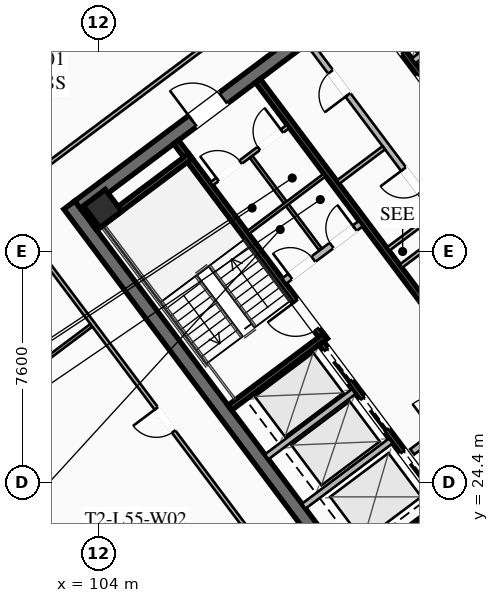
"""IFC4 building model, lengths in metres.
Left out: names, types, materials, properties, quantities, classifications, styles, units other than length and angle.
Written with IfcOpenShell. Run it as: python <this file> out.ifc"""

import sys

from ifc_helpers import new_model, si_unit, direction, frame, frame_2d, origin, origin_2d, place, context, subcontext, project, spatial, rectangle, hollow_rectangle, extrude, element, fill, save


model = new_model("IFC4")
c1 = context("Model", 3, precision=1e-05, world=origin(), true_north=direction((0.0, 1.0)))
c2 = subcontext(c1, "Body", "Model", "MODEL_VIEW")
j1 = project(units=[si_unit("LENGTHUNIT", "METRE"), si_unit("PLANEANGLEUNIT", "RADIAN")], contexts=[c1])
p1 = place(None, origin())
s1 = spatial("IfcSite", under=j1, at=p1, CompositionType="ELEMENT")
p2 = place(p1, origin())
s2 = spatial("IfcBuilding", under=s1, at=p2, CompositionType="ELEMENT")
p3 = place(p2, frame((0.0, 0.0, 204.2)))
s3 = spatial("IfcBuildingStorey", under=s2, at=p3, CompositionType="ELEMENT", Elevation=204.2)
p4 = place(p3, frame((112.396, 21.047, 0.0), z_axis=(0.0, 0.0, 1.0), x_axis=(-0.600005007985, 0.799996243986, 0.0)))
e1 = element("IfcWall", 1, at=p4, inside=s3, PredefinedType="SHEAR", context=c2, shape_type="SweptSolid", body=[
    extrude(rectangle(XDim=15.6, YDim=0.45, at=frame_2d((7.8, 0.0))), origin(), (0.0, 0.0, 1.0), 3.55),
])
p5 = place(p3, frame((124.649, 30.518, 0.0), z_axis=(0.0, 0.0, 1.0), x_axis=(-0.8, -0.6, 0.0)))
e2 = element("IfcWall", 2, at=p5, inside=s3, PredefinedType="SHEAR", context=c2, shape_type="SweptSolid", body=[
    extrude(rectangle(XDim=15.26, YDim=0.45, at=frame_2d((7.63, 0.0))), origin(), (0.0, 0.0, 1.0), 3.55),
])
p6 = place(p5, frame((9.33, 0.0, 0.0)))
e3 = element("IfcOpeningElement", 3, at=p6, cuts=e2, PredefinedType="OPENING", context=c2, shape_type="SweptSolid", body=[
    extrude(rectangle(XDim=1.25, YDim=2.25, at=frame_2d((0.625, 1.125))), frame((0.0, 0.235, 0.0), z_axis=(0.0, -1.0, 0.0), x_axis=(1.0, 0.0, 0.0)), (0.0, 0.0, 1.0), 0.47),
])
p7 = place(p5, frame((4.28, 0.0, 0.0)))
e4 = element("IfcOpeningElement", 4, at=p7, cuts=e2, PredefinedType="OPENING", context=c2, shape_type="SweptSolid", body=[
    extrude(rectangle(XDim=1.25, YDim=2.25, at=frame_2d((0.625, 1.125))), frame((0.0, 0.235, 0.0), z_axis=(0.0, -1.0, 0.0), x_axis=(1.0, 0.0, 0.0)), (0.0, 0.0, 1.0), 0.47),
])
p8 = place(p3, frame((103.351, 33.482, 0.0), z_axis=(0.0, 0.0, 1.0), x_axis=(0.8, 0.6, 0.0)))
e5 = element("IfcWall", 5, at=p8, inside=s3, PredefinedType="SHEAR", context=c2, shape_type="SweptSolid", body=[
    extrude(rectangle(XDim=15.26, YDim=0.45, at=frame_2d((7.63, 0.0))), origin(), (0.0, 0.0, 1.0), 3.55),
])
p9 = place(p8, frame((4.68, 0.0, 0.0)))
e6 = element("IfcOpeningElement", 6, at=p9, cuts=e5, PredefinedType="OPENING", context=c2, shape_type="SweptSolid", body=[
    extrude(rectangle(XDim=1.25, YDim=2.25, at=frame_2d((0.625, 1.125))), frame((0.0, 0.235, 0.0), z_axis=(0.0, -1.0, 0.0), x_axis=(1.0, 0.0, 0.0)), (0.0, 0.0, 1.0), 0.47),
])
p10 = place(p8, frame((9.73, 0.0, 0.0)))
e7 = element("IfcOpeningElement", 7, at=p10, cuts=e5, PredefinedType="OPENING", context=c2, shape_type="SweptSolid", body=[
    extrude(rectangle(XDim=1.25, YDim=2.25, at=frame_2d((0.625, 1.125))), frame((0.0, 0.235, 0.0), z_axis=(0.0, -1.0, 0.0), x_axis=(1.0, 0.0, 0.0)), (0.0, 0.0, 1.0), 0.47),
])
p11 = place(p3, frame((104.13, 33.41, 0.0), z_axis=(0.0, 0.0, 1.0), x_axis=(0.799999996291, 0.600000004945, 0.0)))
e8 = element("IfcColumn", 8, at=p11, inside=s3, PredefinedType="COLUMN", context=c2, shape_type="SweptSolid", body=[
    extrude(hollow_rectangle(XDim=0.9, YDim=0.9, WallThickness=0.04, at=origin_2d()), origin(), (0.0, 0.0, 1.0), 3.37),
])
p12 = place(p3, frame((111.44, 29.08, 0.0), z_axis=(0.0, 0.0, 1.0), x_axis=(-0.59999041401, 0.800007189403, 0.0)))
e9 = element("IfcWall", 9, at=p12, inside=s3, PredefinedType="SHEAR", context=c2, shape_type="SweptSolid", body=[
    extrude(rectangle(XDim=8.15, YDim=0.2, at=frame_2d((4.075, 0.0))), origin(), (0.0, 0.0, 1.0), 3.37),
])
p13 = place(p12, frame((0.45, 0.0, 0.0)))
e10 = element("IfcOpeningElement", 10, at=p13, cuts=e9, PredefinedType="OPENING", context=c2, shape_type="SweptSolid", body=[
    extrude(rectangle(XDim=1.15, YDim=2.2, at=frame_2d((0.575, 1.1))), frame((0.0, 0.11, 0.0), z_axis=(0.0, -1.0, 0.0), x_axis=(1.0, 0.0, 0.0)), (0.0, 0.0, 1.0), 0.22),
])
for number, where, z_axis, x_axis in (
    (11, (108.316, 26.862, 0.0), (0.0, 0.0, 1.0), (0.8, 0.6, 0.0)),
    (12, (103.876, 32.782, 0.0), (0.0, 0.0, 1.0), (0.8, 0.6, 0.0)),
):
    element("IfcWall", number, at=place(p3, frame(where, z_axis=z_axis, x_axis=x_axis)), inside=s3, PredefinedType="SHEAR", context=c2, shape_type="SweptSolid", body=[
        extrude(rectangle(XDim=3.93, YDim=0.2, at=frame_2d((1.965, 0.0))), origin(), (0.0, 0.0, 1.0), 3.37),
    ])
p14 = place(p3, frame((118.058, 25.856, 0.0), z_axis=(0.0, 0.0, 1.0), x_axis=(-0.600002657301, 0.799998007018, 0.0)))
e13 = element("IfcWall", 13, at=p14, inside=s3, PredefinedType="SHEAR", context=c2, shape_type="SweptSolid", body=[
    extrude(rectangle(XDim=14.7, YDim=0.2, at=frame_2d((7.35, 0.0))), origin(), (0.0, 0.0, 1.0), 3.37),
])
p15 = place(p3, frame((110.104, 31.028, 0.0), z_axis=(0.0, 0.0, 1.0), x_axis=(0.800018601094, 0.59997519774, 0.0)))
e14 = element("IfcWall", 14, at=p15, inside=s3, PredefinedType="SOLIDWALL", context=c2, shape_type="SweptSolid", body=[
    extrude(rectangle(XDim=3.15, YDim=0.22, at=frame_2d((1.575, 0.0))), origin(), (0.0, 0.0, 1.0), 2.723),
])
p16 = place(p15, frame((0.25, 0.0, 0.0)))
e15 = element("IfcOpeningElement", 15, at=p16, cuts=e14, PredefinedType="OPENING", context=c2, shape_type="SweptSolid", body=[
    extrude(rectangle(XDim=0.95, YDim=2.05, at=frame_2d((0.475, 1.025))), frame((0.0, 0.12, 0.0), z_axis=(0.0, -1.0, 0.0), x_axis=(1.0, 0.0, 0.0)), (0.0, 0.0, 1.0), 0.24),
])
p17 = place(p15, frame((1.95, 0.0, 0.0)))
e16 = element("IfcOpeningElement", 16, at=p17, cuts=e14, PredefinedType="OPENING", context=c2, shape_type="SweptSolid", body=[
    extrude(rectangle(XDim=0.95, YDim=2.05, at=frame_2d((0.475, 1.025))), frame((0.0, 0.12, 0.0), z_axis=(0.0, -1.0, 0.0), x_axis=(1.0, 0.0, 0.0)), (0.0, 0.0, 1.0), 0.24),
])
p18 = place(p3, frame((114.316, 25.412, 0.0), z_axis=(0.0, 0.0, 1.0), x_axis=(0.800018601094, 0.59997519774, 0.0)))
e17 = element("IfcWall", 17, at=p18, inside=s3, PredefinedType="SOLIDWALL", context=c2, shape_type="SweptSolid", body=[
    extrude(rectangle(XDim=3.15, YDim=0.22, at=frame_2d((1.575, 0.0))), origin(), (0.0, 0.0, 1.0), 2.723),
])
p19 = place(p18, frame((0.95, 0.0, 0.0)))
e18 = element("IfcOpeningElement", 18, at=p19, cuts=e17, PredefinedType="OPENING", context=c2, shape_type="SweptSolid", body=[
    extrude(rectangle(XDim=1.25, YDim=2.25, at=frame_2d((0.625, 1.125))), frame((0.0, 0.12, 0.0), z_axis=(0.0, -1.0, 0.0), x_axis=(1.0, 0.0, 0.0)), (0.0, 0.0, 1.0), 0.24),
])
p20 = place(p3, frame((115.25, 23.75, 0.0), z_axis=(0.0, 0.0, 1.0), x_axis=(-0.599994036198, 0.800004472816, 0.0)))
e19 = element("IfcWall", 19, at=p20, inside=s3, PredefinedType="SHEAR", context=c2, shape_type="SweptSolid", body=[
    extrude(rectangle(XDim=6.55, YDim=0.2, at=frame_2d((3.275, 0.0))), origin(), (0.0, 0.0, 1.0), 3.37),
])
p21 = place(p20, frame((4.975, 0.0, 0.0)))
e20 = element("IfcOpeningElement", 20, at=p21, cuts=e19, PredefinedType="OPENING", context=c2, shape_type="SweptSolid", body=[
    extrude(rectangle(XDim=1.3, YDim=2.25, at=frame_2d((0.65, 1.125))), frame((0.0, 0.11, 0.0), z_axis=(0.0, -1.0, 0.0), x_axis=(1.0, 0.0, 0.0)), (0.0, 0.0, 1.0), 0.22),
])
p22 = place(p20, frame((2.975, 0.0, 0.0)))
e21 = element("IfcOpeningElement", 21, at=p22, cuts=e19, PredefinedType="OPENING", context=c2, shape_type="SweptSolid", body=[
    extrude(rectangle(XDim=1.3, YDim=2.25, at=frame_2d((0.65, 1.125))), frame((0.0, 0.11, 0.0), z_axis=(0.0, -1.0, 0.0), x_axis=(1.0, 0.0, 0.0)), (0.0, 0.0, 1.0), 0.22),
])
p23 = place(p20, frame((0.775, 0.0, 0.0)))
e22 = element("IfcOpeningElement", 22, at=p23, cuts=e19, PredefinedType="OPENING", context=c2, shape_type="SweptSolid", body=[
    extrude(rectangle(XDim=1.3, YDim=2.25, at=frame_2d((0.65, 1.125))), frame((0.0, 0.11, 0.0), z_axis=(0.0, -1.0, 0.0), x_axis=(1.0, 0.0, 0.0)), (0.0, 0.0, 1.0), 0.22),
])
for number, where, z_axis, x_axis in (
    (23, (110.746, 23.622, 0.0), (0.0, 0.0, 1.0), (0.8, 0.6, 0.0)),
    (24, (109.528, 25.246, 0.0), (0.0, 0.0, 1.0), (0.8, 0.6, 0.0)),
):
    element("IfcWall", number, at=place(p3, frame(where, z_axis=z_axis, x_axis=x_axis)), inside=s3, PredefinedType="SOLIDWALL", context=c2, shape_type="SweptSolid", body=[
        extrude(rectangle(XDim=3.58, YDim=0.2, at=frame_2d((1.79, 0.0))), origin(), (0.0, 0.0, 1.0), 3.37),
    ])
p24 = place(p3, frame((112.75, 40.25, 0.0), z_axis=(0.0, 0.0, 1.0), x_axis=(0.599994036198, -0.800004472816, 0.0)))
e25 = element("IfcWall", 25, at=p24, inside=s3, PredefinedType="SHEAR", context=c2, shape_type="SweptSolid", body=[
    extrude(rectangle(XDim=6.55, YDim=0.2, at=frame_2d((3.275, 0.0))), origin(), (0.0, 0.0, 1.0), 3.37),
])
p25 = place(p24, frame((5.075, 0.0, 0.0)))
e26 = element("IfcOpeningElement", 26, at=p25, cuts=e25, PredefinedType="OPENING", context=c2, shape_type="SweptSolid", body=[
    extrude(rectangle(XDim=1.1, YDim=2.2, at=frame_2d((0.55, 1.1))), frame((0.0, 0.11, 0.0), z_axis=(0.0, -1.0, 0.0), x_axis=(1.0, 0.0, 0.0)), (0.0, 0.0, 1.0), 0.22),
])
p26 = place(p24, frame((3.025, 0.0, 0.0)))
e27 = element("IfcOpeningElement", 27, at=p26, cuts=e25, PredefinedType="OPENING", context=c2, shape_type="SweptSolid", body=[
    extrude(rectangle(XDim=1.1, YDim=2.2, at=frame_2d((0.55, 1.1))), frame((0.0, 0.11, 0.0), z_axis=(0.0, -1.0, 0.0), x_axis=(1.0, 0.0, 0.0)), (0.0, 0.0, 1.0), 0.22),
])
p27 = place(p24, frame((1.025, 0.0, 0.0)))
e28 = element("IfcOpeningElement", 28, at=p27, cuts=e25, PredefinedType="OPENING", context=c2, shape_type="SweptSolid", body=[
    extrude(rectangle(XDim=1.1, YDim=2.2, at=frame_2d((0.55, 1.1))), frame((0.0, 0.11, 0.0), z_axis=(0.0, -1.0, 0.0), x_axis=(1.0, 0.0, 0.0)), (0.0, 0.0, 1.0), 0.22),
])
p28 = place(p3, frame((114.36, 38.27, 0.0), z_axis=(0.0, 0.0, 1.0), x_axis=(0.800008183455, 0.599989088572, 0.0)))
e29 = element("IfcWall", 29, at=p28, inside=s3, PredefinedType="SOLIDWALL", context=c2, shape_type="SweptSolid", body=[
    extrude(rectangle(XDim=3.58, YDim=0.2, at=frame_2d((1.79, 0.0))), origin(), (0.0, 0.0, 1.0), 3.37),
])
p29 = place(p3, frame((107.71, 34.22, 0.0), z_axis=(0.0, 0.0, 1.0), x_axis=(0.799981399002, 0.60002480053, 0.0)))
e30 = element("IfcWall", 30, at=p29, inside=s3, PredefinedType="PARTITIONING", context=c2, shape_type="SweptSolid", body=[
    extrude(rectangle(XDim=3.15, YDim=0.135, at=frame_2d((1.575, 0.0))), origin(), (0.0, 0.0, 1.0), 2.723),
])
p30 = place(p29, frame((0.25, 0.0, 0.0)))
e31 = element("IfcOpeningElement", 31, at=p30, cuts=e30, PredefinedType="OPENING", context=c2, shape_type="SweptSolid", body=[
    extrude(rectangle(XDim=0.95, YDim=2.05, at=frame_2d((0.475, 1.025))), frame((0.0, 0.077, 0.0), z_axis=(0.0, -1.0, 0.0), x_axis=(1.0, 0.0, 0.0)), (0.0, 0.0, 1.0), 0.155),
])
p31 = place(p29, frame((1.95, 0.0, 0.0)))
e32 = element("IfcOpeningElement", 32, at=p31, cuts=e30, PredefinedType="OPENING", context=c2, shape_type="SweptSolid", body=[
    extrude(rectangle(XDim=0.95, YDim=2.05, at=frame_2d((0.475, 1.025))), frame((0.0, 0.077, 0.0), z_axis=(0.0, -1.0, 0.0), x_axis=(1.0, 0.0, 0.0)), (0.0, 0.0, 1.0), 0.155),
])
p32 = place(p3, frame((111.296, 32.072, 0.0), z_axis=(0.0, 0.0, 1.0), x_axis=(-0.59995887973, 0.800030838552, 0.0)))
e33 = element("IfcWall", 33, at=p32, inside=s3, PredefinedType="PARTITIONING", context=c2, shape_type="SweptSolid", body=[
    extrude(rectangle(XDim=3.8, YDim=0.11, at=frame_2d((1.9, 0.0))), origin(), (0.0, 0.0, 1.0), 2.723),
])
p33 = place(p3, frame((108.91, 32.62, 0.0), z_axis=(0.0, 0.0, 1.0), x_axis=(0.800018601094, 0.59997519774, 0.0)))
e34 = element("IfcWall", 34, at=p33, inside=s3, PredefinedType="PARTITIONING", context=c2, shape_type="SweptSolid", body=[
    extrude(rectangle(XDim=3.15, YDim=0.11, at=frame_2d((1.575, 0.0))), origin(), (0.0, 0.0, 1.0), 2.723),
])
p34 = place(p3, frame((113.946, 31.522, 0.0), z_axis=(0.0, 0.0, 1.0), x_axis=(0.8, 0.6, 0.0)))
e35 = element("IfcWall", 35, at=p34, inside=s3, PredefinedType="PARTITIONING", context=c2, shape_type="SweptSolid", body=[
    extrude(rectangle(XDim=1.88, YDim=0.135, at=frame_2d((0.94, 0.0))), origin(), (0.0, 0.0, 1.0), 2.723),
])
p35 = place(p3, frame((115.11, 33.27, 0.0), z_axis=(0.0, 0.0, 1.0), x_axis=(-0.600011160345, 0.79999162962, 0.0)))
e36 = element("IfcWall", 36, at=p35, inside=s3, PredefinedType="SOLIDWALL", context=c2, shape_type="SweptSolid", body=[
    extrude(rectangle(XDim=7.0, YDim=0.2, at=frame_2d((3.5, 0.0))), origin(), (0.0, 0.0, 1.0), 2.723),
])
p36 = place(p35, frame((0.85, 0.0, 0.0)))
e37 = element("IfcOpeningElement", 37, at=p36, cuts=e36, PredefinedType="OPENING", context=c2, shape_type="SweptSolid", body=[
    extrude(rectangle(XDim=0.95, YDim=2.05, at=frame_2d((0.475, 1.025))), frame((0.0, 0.11, 0.0), z_axis=(0.0, -1.0, 0.0), x_axis=(1.0, 0.0, 0.0)), (0.0, 0.0, 1.0), 0.22),
])
p37 = place(p35, frame((4.85, 0.0, 0.0)))
e38 = element("IfcOpeningElement", 38, at=p37, cuts=e36, PredefinedType="OPENING", context=c2, shape_type="SweptSolid", body=[
    extrude(rectangle(XDim=0.95, YDim=2.05, at=frame_2d((0.475, 1.025))), frame((0.0, 0.11, 0.0), z_axis=(0.0, -1.0, 0.0), x_axis=(1.0, 0.0, 0.0)), (0.0, 0.0, 1.0), 0.22),
])
p38 = place(p3, frame((113.526, 32.082, 0.0), z_axis=(0.0, 0.0, 1.0), x_axis=(0.800046745961, 0.599937666993, 0.0)))
e39 = element("IfcWall", 39, at=p38, inside=s3, PredefinedType="PARTITIONING", context=c2, shape_type="SweptSolid", body=[
    extrude(rectangle(XDim=1.88, YDim=0.135, at=frame_2d((0.94, 0.0))), origin(), (0.0, 0.0, 1.0), 2.723),
])
p39 = place(p3, frame((111.876, 34.282, 0.0), z_axis=(0.0, 0.0, 1.0), x_axis=(0.8, 0.6, 0.0)))
e40 = element("IfcWall", 40, at=p39, inside=s3, PredefinedType="PARTITIONING", context=c2, shape_type="SweptSolid", body=[
    extrude(rectangle(XDim=1.88, YDim=0.135, at=frame_2d((0.94, 0.0))), origin(), (0.0, 0.0, 1.0), 2.723),
])
p40 = place(p3, frame((100.756, 33.692, 0.0), z_axis=(0.0, 0.0, 1.0), x_axis=(0.799998716732, 0.60000171102, 0.0)))
e41 = element("IfcWall", 41, at=p40, inside=s3, PredefinedType="PARTITIONING", context=c2, shape_type="SweptSolid", body=[
    extrude(rectangle(XDim=22.83, YDim=0.135, at=frame_2d((11.415, 0.0))), origin(), (0.0, 0.0, 1.0), 2.723),
])
p41 = place(p40, frame((9.38, 0.0, 0.0)))
e42 = element("IfcOpeningElement", 42, at=p41, cuts=e41, PredefinedType="OPENING", context=c2, shape_type="SweptSolid", body=[
    extrude(rectangle(XDim=0.95, YDim=2.05, at=frame_2d((0.475, 1.025))), frame((0.0, 0.077, 0.0), z_axis=(0.0, -1.0, 0.0), x_axis=(1.0, 0.0, 0.0)), (0.0, 0.0, 1.0), 0.155),
])
p42 = place(p40, frame((21.58, 0.0, 0.0)))
e43 = element("IfcOpeningElement", 43, at=p42, cuts=e41, PredefinedType="OPENING", context=c2, shape_type="SweptSolid", body=[
    extrude(rectangle(XDim=0.95, YDim=2.05, at=frame_2d((0.475, 1.025))), frame((0.0, 0.077, 0.0), z_axis=(0.0, -1.0, 0.0), x_axis=(1.0, 0.0, 0.0)), (0.0, 0.0, 1.0), 0.155),
])
p43 = place(p3, frame((124.462, 25.384, 0.0), z_axis=(0.0, 0.0, 1.0), x_axis=(-0.799997904343, -0.6000027942, 0.0)))
e44 = element("IfcWall", 44, at=p43, inside=s3, PredefinedType="PARTITIONING", context=c2, shape_type="SweptSolid", body=[
    extrude(rectangle(XDim=13.98, YDim=0.135, at=frame_2d((6.99, 0.0))), origin(), (0.0, 0.0, 1.0), 2.723),
])
p44 = place(p43, frame((3.635, 0.0, 0.0)))
e45 = element("IfcOpeningElement", 45, at=p44, cuts=e44, PredefinedType="OPENING", context=c2, shape_type="SweptSolid", body=[
    extrude(rectangle(XDim=0.95, YDim=2.05, at=frame_2d((0.475, 1.025))), frame((0.0, 0.077, 0.0), z_axis=(0.0, -1.0, 0.0), x_axis=(1.0, 0.0, 0.0)), (0.0, 0.0, 1.0), 0.155),
])
p45 = place(p3, frame((113.23, 17.06, 0.0), z_axis=(0.0, 0.0, 1.0), x_axis=(-0.600003772342, 0.79999717073, 0.0)))
e46 = element("IfcWall", 46, at=p45, inside=s3, PredefinedType="PARTITIONING", context=c2, shape_type="SweptSolid", body=[
    extrude(rectangle(XDim=20.71, YDim=0.135, at=frame_2d((10.355, 0.0))), origin(), (0.0, 0.0, 1.0), 2.723),
])
p46 = place(p45, frame((0.3, 0.0, 0.0)))
e47 = element("IfcOpeningElement", 47, at=p46, cuts=e46, PredefinedType="OPENING", context=c2, shape_type="SweptSolid", body=[
    extrude(rectangle(XDim=0.95, YDim=2.05, at=frame_2d((0.475, 1.025))), frame((0.0, 0.077, 0.0), z_axis=(0.0, -1.0, 0.0), x_axis=(1.0, 0.0, 0.0)), (0.0, 0.0, 1.0), 0.155),
])
p47 = place(p45, frame((11.272, 0.0, 0.0)))
e48 = element("IfcOpeningElement", 48, at=p47, cuts=e46, PredefinedType="OPENING", context=c2, shape_type="SweptSolid", body=[
    extrude(rectangle(XDim=0.95, YDim=2.05, at=frame_2d((0.475, 1.025))), frame((0.0, 0.077, 0.0), z_axis=(0.0, -1.0, 0.0), x_axis=(1.0, 0.0, 0.0)), (0.0, 0.0, 1.0), 0.155),
])
p48 = place(p45, frame((19.46, 0.0, 0.0)))
e49 = element("IfcOpeningElement", 49, at=p48, cuts=e46, PredefinedType="OPENING", context=c2, shape_type="SweptSolid", body=[
    extrude(rectangle(XDim=0.95, YDim=2.05, at=frame_2d((0.475, 1.025))), frame((0.0, 0.077, 0.0), z_axis=(0.0, -1.0, 0.0), x_axis=(1.0, 0.0, 0.0)), (0.0, 0.0, 1.0), 0.155),
])
p49 = place(p3, frame((99.096, 26.072, 0.0), z_axis=(0.0, 0.0, 1.0), x_axis=(0.800005033825, 0.599993288175, 0.0)))
e50 = element("IfcWall", 50, at=p49, inside=s3, PredefinedType="PARTITIONING", context=c2, shape_type="SweptSolid", body=[
    extrude(rectangle(XDim=5.82, YDim=0.11, at=frame_2d((2.91, 0.0))), origin(), (0.0, 0.0, 1.0), 2.723),
])
p50 = place(p9, origin())
e51 = element("IfcDoor", 51, at=p50, inside=s3, OperationType="SINGLE_SWING_LEFT", PredefinedType="DOOR", context=c2, shape_type="SweptSolid", body=[
    extrude(rectangle(XDim=1.25, YDim=2.25, at=frame_2d((0.625, 1.125))), frame((0.0, 0.025, 0.0), z_axis=(0.0, -1.0, 0.0), x_axis=(1.0, 0.0, 0.0)), (0.0, 0.0, 1.0), 0.05),
])
fill(e6, e51)
p51 = place(p13, origin())
e52 = element("IfcDoor", 52, at=p51, inside=s3, OperationType="SINGLE_SWING_RIGHT", PredefinedType="DOOR", context=c2, shape_type="SweptSolid", body=[
    extrude(rectangle(XDim=1.15, YDim=2.2, at=frame_2d((0.575, 1.1))), frame((0.0, 0.025, 0.0), z_axis=(0.0, -1.0, 0.0), x_axis=(1.0, 0.0, 0.0)), (0.0, 0.0, 1.0), 0.05),
])
fill(e10, e52)
p52 = place(p30, origin())
e53 = element("IfcDoor", 53, at=p52, inside=s3, OperationType="SINGLE_SWING_LEFT", PredefinedType="DOOR", context=c2, shape_type="SweptSolid", body=[
    extrude(rectangle(XDim=0.95, YDim=2.05, at=frame_2d((0.475, 1.025))), frame((0.0, 0.025, 0.0), z_axis=(0.0, -1.0, 0.0), x_axis=(1.0, 0.0, 0.0)), (0.0, 0.0, 1.0), 0.05),
])
fill(e31, e53)
p53 = place(p31, origin())
e54 = element("IfcDoor", 54, at=p53, inside=s3, OperationType="SINGLE_SWING_RIGHT", PredefinedType="DOOR", context=c2, shape_type="SweptSolid", body=[
    extrude(rectangle(XDim=0.95, YDim=2.05, at=frame_2d((0.475, 1.025))), frame((0.0, 0.025, 0.0), z_axis=(0.0, -1.0, 0.0), x_axis=(1.0, 0.0, 0.0)), (0.0, 0.0, 1.0), 0.05),
])
fill(e32, e54)
p54 = place(p16, origin())
e55 = element("IfcDoor", 55, at=p54, inside=s3, OperationType="SINGLE_SWING_LEFT", PredefinedType="DOOR", context=c2, shape_type="SweptSolid", body=[
    extrude(rectangle(XDim=0.95, YDim=2.05, at=frame_2d((0.475, 1.025))), frame((0.0, 0.025, 0.0), z_axis=(0.0, -1.0, 0.0), x_axis=(1.0, 0.0, 0.0)), (0.0, 0.0, 1.0), 0.05),
])
fill(e15, e55)
p55 = place(p17, origin())
e56 = element("IfcDoor", 56, at=p55, inside=s3, OperationType="SINGLE_SWING_RIGHT", PredefinedType="DOOR", context=c2, shape_type="SweptSolid", body=[
    extrude(rectangle(XDim=0.95, YDim=2.05, at=frame_2d((0.475, 1.025))), frame((0.0, 0.025, 0.0), z_axis=(0.0, -1.0, 0.0), x_axis=(1.0, 0.0, 0.0)), (0.0, 0.0, 1.0), 0.05),
])
fill(e16, e56)
p56 = place(p36, origin())
e57 = element("IfcDoor", 57, at=p56, inside=s3, OperationType="SINGLE_SWING_RIGHT", PredefinedType="DOOR", context=c2, shape_type="SweptSolid", body=[
    extrude(rectangle(XDim=0.95, YDim=2.05, at=frame_2d((0.475, 1.025))), frame((0.0, 0.025, 0.0), z_axis=(0.0, -1.0, 0.0), x_axis=(1.0, 0.0, 0.0)), (0.0, 0.0, 1.0), 0.05),
])
fill(e37, e57)
p57 = place(p37, origin())
e58 = element("IfcDoor", 58, at=p57, inside=s3, OperationType="SINGLE_SWING_LEFT", PredefinedType="DOOR", context=c2, shape_type="SweptSolid", body=[
    extrude(rectangle(XDim=0.95, YDim=2.05, at=frame_2d((0.475, 1.025))), frame((0.0, 0.025, 0.0), z_axis=(0.0, -1.0, 0.0), x_axis=(1.0, 0.0, 0.0)), (0.0, 0.0, 1.0), 0.05),
])
fill(e38, e58)
p58 = place(p47, origin())
e59 = element("IfcDoor", 59, at=p58, inside=s3, OperationType="SINGLE_SWING_RIGHT", PredefinedType="DOOR", context=c2, shape_type="SweptSolid", body=[
    extrude(rectangle(XDim=0.95, YDim=2.05, at=frame_2d((0.475, 1.025))), frame((0.0, 0.025, 0.0), z_axis=(0.0, -1.0, 0.0), x_axis=(1.0, 0.0, 0.0)), (0.0, 0.0, 1.0), 0.05),
])
fill(e48, e59)
p59 = place(p21, origin())
e60 = element("IfcDoor", 60, at=p59, inside=s3, OperationType="SLIDING_TO_LEFT", PredefinedType="DOOR", context=c2, shape_type="SweptSolid", body=[
    extrude(rectangle(XDim=1.3, YDim=2.25, at=frame_2d((0.65, 1.125))), frame((0.0, 0.025, 0.0), z_axis=(0.0, -1.0, 0.0), x_axis=(1.0, 0.0, 0.0)), (0.0, 0.0, 1.0), 0.05),
])
fill(e20, e60)
p60 = place(p22, origin())
e61 = element("IfcDoor", 61, at=p60, inside=s3, OperationType="SLIDING_TO_LEFT", PredefinedType="DOOR", context=c2, shape_type="SweptSolid", body=[
    extrude(rectangle(XDim=1.3, YDim=2.25, at=frame_2d((0.65, 1.125))), frame((0.0, 0.025, 0.0), z_axis=(0.0, -1.0, 0.0), x_axis=(1.0, 0.0, 0.0)), (0.0, 0.0, 1.0), 0.05),
])
fill(e21, e61)
p61 = place(p23, origin())
e62 = element("IfcDoor", 62, at=p61, inside=s3, OperationType="SLIDING_TO_LEFT", PredefinedType="DOOR", context=c2, shape_type="SweptSolid", body=[
    extrude(rectangle(XDim=1.3, YDim=2.25, at=frame_2d((0.65, 1.125))), frame((0.0, 0.025, 0.0), z_axis=(0.0, -1.0, 0.0), x_axis=(1.0, 0.0, 0.0)), (0.0, 0.0, 1.0), 0.05),
])
fill(e22, e62)
p62 = place(p26, origin())
e63 = element("IfcDoor", 63, at=p62, inside=s3, OperationType="SLIDING_TO_LEFT", PredefinedType="DOOR", context=c2, shape_type="SweptSolid", body=[
    extrude(rectangle(XDim=1.1, YDim=2.2, at=frame_2d((0.55, 1.1))), frame((0.0, 0.025, 0.0), z_axis=(0.0, -1.0, 0.0), x_axis=(1.0, 0.0, 0.0)), (0.0, 0.0, 1.0), 0.05),
])
fill(e27, e63)
p63 = place(p27, origin())
e64 = element("IfcDoor", 64, at=p63, inside=s3, OperationType="SLIDING_TO_LEFT", PredefinedType="DOOR", context=c2, shape_type="SweptSolid", body=[
    extrude(rectangle(XDim=1.1, YDim=2.2, at=frame_2d((0.55, 1.1))), frame((0.0, 0.025, 0.0), z_axis=(0.0, -1.0, 0.0), x_axis=(1.0, 0.0, 0.0)), (0.0, 0.0, 1.0), 0.05),
])
fill(e28, e64)
save(model, sys.argv[1])
